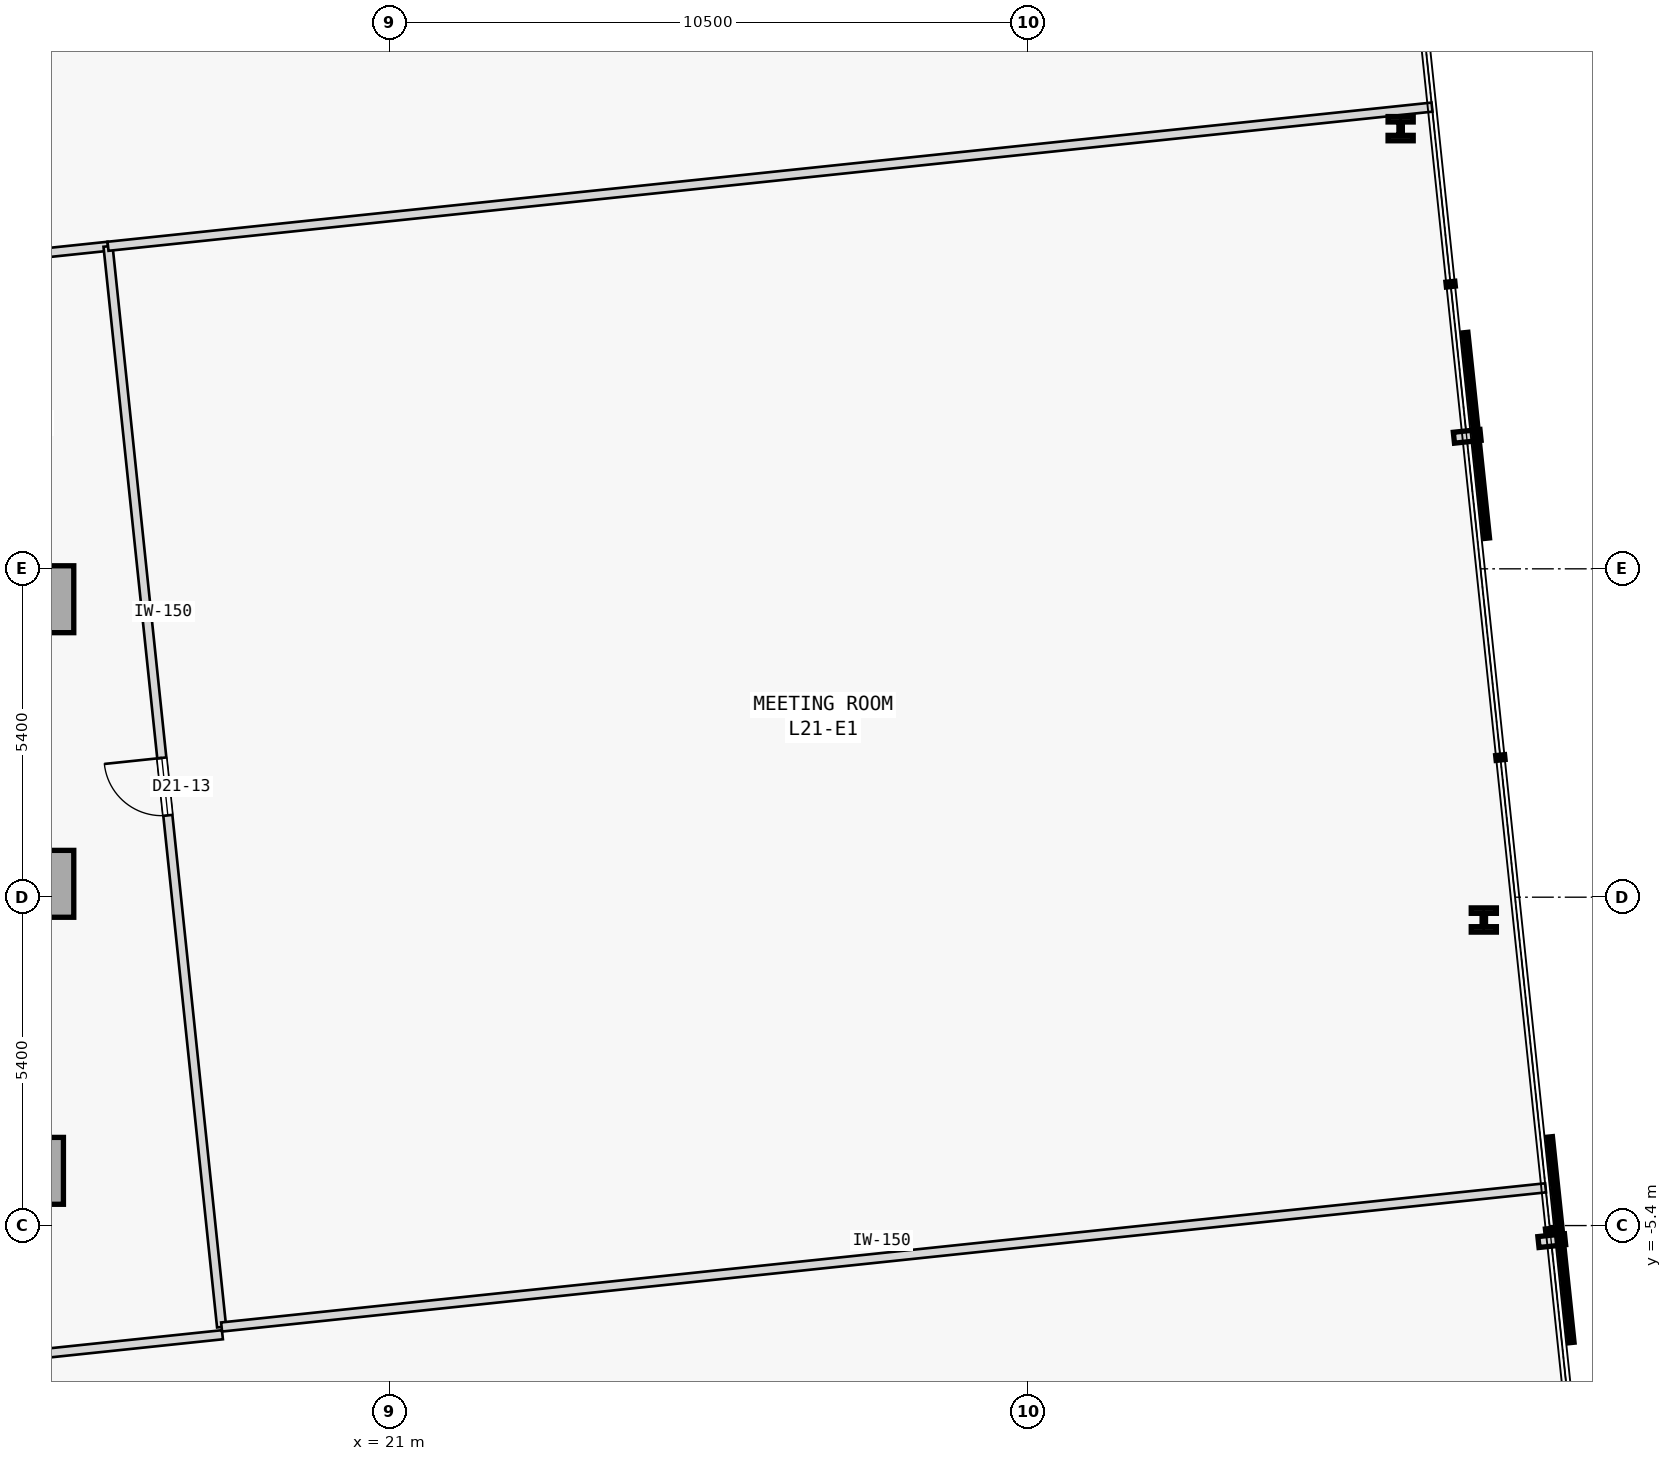
"""IFC4 building model, lengths in metres.
Left out: names, types, materials, properties, quantities, classifications, styles, units other than length and angle.
Written with IfcOpenShell. Run it as: python <this file> out.ifc"""

import sys

from ifc_helpers import new_model, si_unit, direction, frame, frame_2d, origin, origin_2d, place, context, subcontext, project, spatial, rectangle, i_section, extrude, element, fill, save


model = new_model("IFC4")
c1 = context("Model", 3, precision=1e-05, world=origin(), true_north=direction((0.0, 1.0)))
c2 = subcontext(c1, "Body", "Model", "MODEL_VIEW")
j1 = project(units=[si_unit("LENGTHUNIT", "METRE"), si_unit("PLANEANGLEUNIT", "RADIAN")], contexts=[c1])
p1 = place(None, origin())
s1 = spatial("IfcSite", under=j1, at=p1, CompositionType="ELEMENT")
p2 = place(p1, origin())
s2 = spatial("IfcBuilding", under=s1, at=p2, CompositionType="ELEMENT")
p3 = place(p2, frame((0.0, 0.0, 87.4)))
s3 = spatial("IfcBuildingStorey", under=s2, at=p3, CompositionType="ELEMENT", Elevation=87.4)
for number, where, z_axis, x_axis in (
    (1, (15.25, 4.9, 0.0), (0.0, 0.0, 1.0), (1.0, 0.0, 0.0)),
    (2, (15.25, 0.22, 0.0), (0.0, 0.0, 1.0), (1.0, 0.0, 0.0)),
    (3, (15.08, -4.5, 0.0), (0.0, 0.0, 1.0), (1.0, 0.0, 0.0)),
):
    element("IfcColumn", number, at=place(p3, frame(where, z_axis=z_axis, x_axis=x_axis)), inside=s3, PredefinedType="COLUMN", context=c2, shape_type="SweptSolid", body=[
        extrude(rectangle(XDim=1.1, YDim=1.1, at=origin_2d()), origin(), (0.0, 0.0, 1.0), 3.7),
    ])
for number, where, z_axis, x_axis in (
    (4, (38.988, -0.375, 0.0), (0.0, 0.0, 1.0), (1.0, 0.0, 0.0)),
    (5, (37.621, 12.638, 0.0), (0.0, 0.0, 1.0), (1.0, 0.0, 0.0)),
):
    element("IfcColumn", number, at=place(p3, frame(where, z_axis=z_axis, x_axis=x_axis)), inside=s3, PredefinedType="COLUMN", context=c2, shape_type="SweptSolid", body=[
        extrude(i_section(OverallWidth=0.413, OverallDepth=0.398, WebThickness=0.056, FlangeThickness=0.089, FilletRadius=0.015, at=origin_2d()), origin(), (0.0, 0.0, 1.0), 3.7),
    ])
p4 = place(p3, frame((-18.021, 7.09, 0.0), z_axis=(0.0, 0.0, 1.0), x_axis=(0.994522464549, 0.104523047737, 0.0)))
e6 = element("IfcWall", 6, at=p4, inside=s3, PredefinedType="PARTITIONING", context=c2, shape_type="SweptSolid", body=[
    extrude(rectangle(XDim=34.574, YDim=0.15, at=frame_2d((17.287, 0.0))), origin(), (0.0, 0.0, 1.0), 3.475),
])
p5 = place(p4, frame((16.812, 0.0, 0.0)))
e7 = element("IfcOpeningElement", 7, at=p5, cuts=e6, PredefinedType="OPENING", context=c2, shape_type="SweptSolid", body=[
    extrude(rectangle(XDim=0.95, YDim=2.15, at=frame_2d((0.475, 1.075))), frame((0.0, 0.085, 0.0), z_axis=(0.0, -1.0, 0.0), x_axis=(1.0, 0.0, 0.0)), (0.0, 0.0, 1.0), 0.17),
])
p6 = place(p3, frame((0.361, -9.075, 0.0), z_axis=(0.0, 0.0, 1.0), x_axis=(0.994523293042, 0.104515164432, 0.0)))
e8 = element("IfcWall", 8, at=p6, inside=s3, PredefinedType="PARTITIONING", context=c2, shape_type="SweptSolid", body=[
    extrude(rectangle(XDim=17.982, YDim=0.15, at=frame_2d((8.991, 0.0))), origin(), (0.0, 0.0, 1.0), 3.475),
])
p7 = place(p6, frame((5.819, 0.0, 0.0)))
e9 = element("IfcOpeningElement", 9, at=p7, cuts=e8, PredefinedType="OPENING", context=c2, shape_type="SweptSolid", body=[
    extrude(rectangle(XDim=0.95, YDim=2.15, at=frame_2d((0.475, 1.075))), frame((0.0, 0.085, 0.0), z_axis=(0.0, -1.0, 0.0), x_axis=(1.0, 0.0, 0.0)), (0.0, 0.0, 1.0), 0.17),
])
p8 = place(p3, frame((18.231, -7.068, 0.0), z_axis=(0.0, 0.0, 1.0), x_axis=(-0.104529034836, 0.994521835294, 0.0)))
e10 = element("IfcWall", 10, at=p8, inside=s3, PredefinedType="PARTITIONING", context=c2, shape_type="SweptSolid", body=[
    extrude(rectangle(XDim=17.87, YDim=0.15, at=frame_2d((8.935, 0.0))), origin(), (0.0, 0.0, 1.0), 3.475),
])
p9 = place(p8, frame((8.46, 0.0, 0.0)))
e11 = element("IfcOpeningElement", 11, at=p9, cuts=e10, PredefinedType="OPENING", context=c2, shape_type="SweptSolid", body=[
    extrude(rectangle(XDim=0.95, YDim=2.15, at=frame_2d((0.475, 1.075))), frame((0.0, 0.085, 0.0), z_axis=(0.0, -1.0, 0.0), x_axis=(1.0, 0.0, 0.0)), (0.0, 0.0, 1.0), 0.17),
])
p10 = place(p3, frame((16.363, 10.704, 0.0), z_axis=(0.0, 0.0, 1.0), x_axis=(0.994521206634, 0.104535015934, 0.0)))
e12 = element("IfcWall", 12, at=p10, inside=s3, PredefinedType="PARTITIONING", context=c2, shape_type="SweptSolid", body=[
    extrude(rectangle(XDim=21.893, YDim=0.15, at=frame_2d((10.946, 0.0))), origin(), (0.0, 0.0, 1.0), 3.475),
])
p11 = place(p3, frame((18.231, -7.068, 0.0), z_axis=(0.0, 0.0, 1.0), x_axis=(0.994521328491, 0.104533856601, 0.0)))
e13 = element("IfcWall", 13, at=p11, inside=s3, PredefinedType="PARTITIONING", context=c2, shape_type="SweptSolid", body=[
    extrude(rectangle(XDim=21.893, YDim=0.15, at=frame_2d((10.947, 0.0))), origin(), (0.0, 0.0, 1.0), 3.475),
])
p12 = place(p9, origin())
e14 = element("IfcDoor", 14, at=p12, inside=s3, OperationType="SINGLE_SWING_RIGHT", PredefinedType="DOOR", context=c2, shape_type="SweptSolid", body=[
    extrude(rectangle(XDim=0.95, YDim=2.15, at=frame_2d((0.475, 1.075))), frame((0.0, 0.025, 0.0), z_axis=(0.0, -1.0, 0.0), x_axis=(1.0, 0.0, 0.0)), (0.0, 0.0, 1.0), 0.05),
])
fill(e11, e14)
save(model, sys.argv[1])
